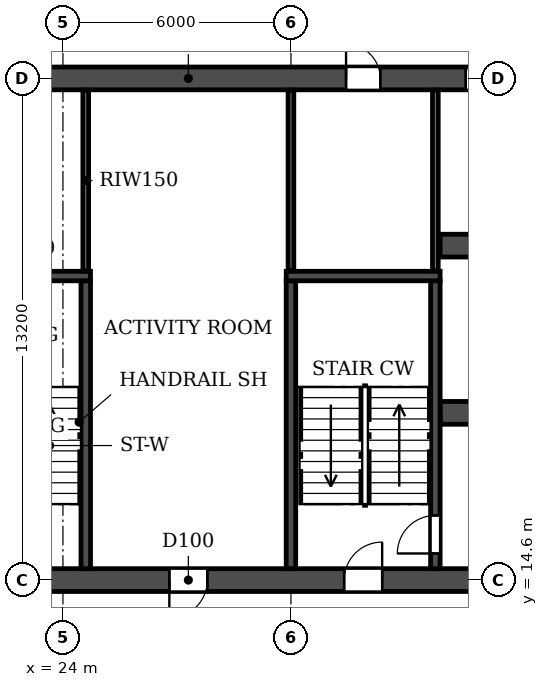
"""IFC4 building model, lengths in metres.
Left out: names, types, materials, properties, quantities, classifications, styles, units other than length and angle.
Written with IfcOpenShell. Run it as: python <this file> out.ifc"""

import sys

from ifc_helpers import new_model, si_unit, direction, frame, frame_2d, origin, place, context, subcontext, project, spatial, rectangle, extrude, element, fill, save


model = new_model("IFC4")
c1 = context("Model", 3, precision=1e-05, world=origin(), true_north=direction((0.0, 1.0)))
c2 = subcontext(c1, "Body", "Model", "MODEL_VIEW")
j1 = project(units=[si_unit("LENGTHUNIT", "METRE"), si_unit("PLANEANGLEUNIT", "RADIAN")], contexts=[c1])
p1 = place(None, origin())
s1 = spatial("IfcSite", under=j1, at=p1, CompositionType="ELEMENT")
p2 = place(p1, origin())
s2 = spatial("IfcBuilding", under=s1, at=p2, CompositionType="ELEMENT")
p3 = place(p2, frame((0.0, 0.0, 23.4)))
s3 = spatial("IfcBuildingStorey", under=s2, at=p3, CompositionType="ELEMENT", Elevation=23.4)
p4 = place(p3, frame((2.6, 14.6, 0.0), z_axis=(0.0, 0.0, 1.0), x_axis=(1.0, 0.0, 0.0)))
e1 = element("IfcWall", 1, at=p4, inside=s3, PredefinedType="SOLIDWALL", context=c2, shape_type="SweptSolid", body=[
    extrude(rectangle(XDim=96.8, YDim=0.6, at=frame_2d((48.4, 0.0))), origin(), (0.0, 0.0, 1.0), 3.05),
])
p5 = place(p4, frame((7.2, 0.0, 0.0)))
e2 = element("IfcOpeningElement", 2, at=p5, cuts=e1, PredefinedType="OPENING", context=c2, shape_type="SweptSolid", body=[
    extrude(rectangle(XDim=1.0, YDim=2.1, at=frame_2d((0.5, 1.05))), frame((0.0, 0.31, 0.0), z_axis=(0.0, -1.0, 0.0), x_axis=(1.0, 0.0, 0.0)), (0.0, 0.0, 1.0), 0.62),
])
p6 = place(p4, frame((16.3, 0.0, 0.0)))
e3 = element("IfcOpeningElement", 3, at=p6, cuts=e1, PredefinedType="OPENING", context=c2, shape_type="SweptSolid", body=[
    extrude(rectangle(XDim=1.0, YDim=2.1, at=frame_2d((0.5, 1.05))), frame((0.0, 0.31, 0.0), z_axis=(0.0, -1.0, 0.0), x_axis=(1.0, 0.0, 0.0)), (0.0, 0.0, 1.0), 0.62),
])
p7 = place(p4, frame((24.2, 0.0, 0.0)))
e4 = element("IfcOpeningElement", 4, at=p7, cuts=e1, PredefinedType="OPENING", context=c2, shape_type="SweptSolid", body=[
    extrude(rectangle(XDim=1.0, YDim=2.1, at=frame_2d((0.5, 1.05))), frame((0.0, 0.31, 0.0), z_axis=(0.0, -1.0, 0.0), x_axis=(1.0, 0.0, 0.0)), (0.0, 0.0, 1.0), 0.62),
])
p8 = place(p4, frame((28.8, 0.0, 0.0)))
e5 = element("IfcOpeningElement", 5, at=p8, cuts=e1, PredefinedType="OPENING", context=c2, shape_type="SweptSolid", body=[
    extrude(rectangle(XDim=1.0, YDim=2.1, at=frame_2d((0.5, 1.05))), frame((0.0, 0.31, 0.0), z_axis=(0.0, -1.0, 0.0), x_axis=(1.0, 0.0, 0.0)), (0.0, 0.0, 1.0), 0.62),
])
p9 = place(p4, frame((40.1, 0.0, 0.0)))
e6 = element("IfcOpeningElement", 6, at=p9, cuts=e1, PredefinedType="OPENING", context=c2, shape_type="SweptSolid", body=[
    extrude(rectangle(XDim=1.0, YDim=2.1, at=frame_2d((0.5, 1.05))), frame((0.0, 0.31, 0.0), z_axis=(0.0, -1.0, 0.0), x_axis=(1.0, 0.0, 0.0)), (0.0, 0.0, 1.0), 0.62),
])
p10 = place(p4, frame((44.0, 0.0, 0.0)))
e7 = element("IfcOpeningElement", 7, at=p10, cuts=e1, PredefinedType="OPENING", context=c2, shape_type="SweptSolid", body=[
    extrude(rectangle(XDim=1.0, YDim=2.1, at=frame_2d((0.5, 1.05))), frame((0.0, 0.31, 0.0), z_axis=(0.0, -1.0, 0.0), x_axis=(1.0, 0.0, 0.0)), (0.0, 0.0, 1.0), 0.62),
])
p11 = place(p4, frame((47.9, 0.0, 0.0)))
e8 = element("IfcOpeningElement", 8, at=p11, cuts=e1, PredefinedType="OPENING", context=c2, shape_type="SweptSolid", body=[
    extrude(rectangle(XDim=1.0, YDim=2.1, at=frame_2d((0.5, 1.05))), frame((0.0, 0.31, 0.0), z_axis=(0.0, -1.0, 0.0), x_axis=(1.0, 0.0, 0.0)), (0.0, 0.0, 1.0), 0.62),
])
p12 = place(p4, frame((53.1, 0.0, 0.0)))
e9 = element("IfcOpeningElement", 9, at=p12, cuts=e1, PredefinedType="OPENING", context=c2, shape_type="SweptSolid", body=[
    extrude(rectangle(XDim=1.0, YDim=2.1, at=frame_2d((0.5, 1.05))), frame((0.0, 0.31, 0.0), z_axis=(0.0, -1.0, 0.0), x_axis=(1.0, 0.0, 0.0)), (0.0, 0.0, 1.0), 0.62),
])
p13 = place(p4, frame((67.0, 0.0, 0.0)))
e10 = element("IfcOpeningElement", 10, at=p13, cuts=e1, PredefinedType="OPENING", context=c2, shape_type="SweptSolid", body=[
    extrude(rectangle(XDim=1.0, YDim=2.1, at=frame_2d((0.5, 1.05))), frame((0.0, 0.31, 0.0), z_axis=(0.0, -1.0, 0.0), x_axis=(1.0, 0.0, 0.0)), (0.0, 0.0, 1.0), 0.62),
])
p14 = place(p4, frame((71.6, 0.0, 0.0)))
e11 = element("IfcOpeningElement", 11, at=p14, cuts=e1, PredefinedType="OPENING", context=c2, shape_type="SweptSolid", body=[
    extrude(rectangle(XDim=1.0, YDim=2.1, at=frame_2d((0.5, 1.05))), frame((0.0, 0.31, 0.0), z_axis=(0.0, -1.0, 0.0), x_axis=(1.0, 0.0, 0.0)), (0.0, 0.0, 1.0), 0.62),
])
p15 = place(p4, frame((79.5, 0.0, 0.0)))
e12 = element("IfcOpeningElement", 12, at=p15, cuts=e1, PredefinedType="OPENING", context=c2, shape_type="SweptSolid", body=[
    extrude(rectangle(XDim=1.0, YDim=2.1, at=frame_2d((0.5, 1.05))), frame((0.0, 0.31, 0.0), z_axis=(0.0, -1.0, 0.0), x_axis=(1.0, 0.0, 0.0)), (0.0, 0.0, 1.0), 0.62),
])
p16 = place(p4, frame((83.15, 0.0, 0.0)))
e13 = element("IfcOpeningElement", 13, at=p16, cuts=e1, PredefinedType="OPENING", context=c2, shape_type="SweptSolid", body=[
    extrude(rectangle(XDim=1.0, YDim=2.1, at=frame_2d((0.5, 1.05))), frame((0.0, 0.31, 0.0), z_axis=(0.0, -1.0, 0.0), x_axis=(1.0, 0.0, 0.0)), (0.0, 0.0, 1.0), 0.62),
])
p17 = place(p4, frame((90.85, 0.0, 0.0)))
e14 = element("IfcOpeningElement", 14, at=p17, cuts=e1, PredefinedType="OPENING", context=c2, shape_type="SweptSolid", body=[
    extrude(rectangle(XDim=1.0, YDim=2.1, at=frame_2d((0.5, 1.05))), frame((0.0, 0.31, 0.0), z_axis=(0.0, -1.0, 0.0), x_axis=(1.0, 0.0, 0.0)), (0.0, 0.0, 1.0), 0.62),
])
p18 = place(p3, frame((2.6, 27.8, 0.0), z_axis=(0.0, 0.0, 1.0), x_axis=(1.0, 0.0, 0.0)))
e15 = element("IfcWall", 15, at=p18, inside=s3, PredefinedType="SOLIDWALL", context=c2, shape_type="SweptSolid", body=[
    extrude(rectangle(XDim=96.8, YDim=0.6, at=frame_2d((48.4, 0.0))), origin(), (0.0, 0.0, 1.0), 3.05),
])
p19 = place(p18, frame((1.8, 0.0, 0.0)))
e16 = element("IfcOpeningElement", 16, at=p19, cuts=e15, PredefinedType="OPENING", context=c2, shape_type="SweptSolid", body=[
    extrude(rectangle(XDim=1.0, YDim=2.1, at=frame_2d((0.5, 1.05))), frame((0.0, 0.31, 0.0), z_axis=(0.0, -1.0, 0.0), x_axis=(1.0, 0.0, 0.0)), (0.0, 0.0, 1.0), 0.62),
])
p20 = place(p18, frame((9.5, 0.0, 0.0)))
e17 = element("IfcOpeningElement", 17, at=p20, cuts=e15, PredefinedType="OPENING", context=c2, shape_type="SweptSolid", body=[
    extrude(rectangle(XDim=1.0, YDim=2.1, at=frame_2d((0.5, 1.05))), frame((0.0, 0.31, 0.0), z_axis=(0.0, -1.0, 0.0), x_axis=(1.0, 0.0, 0.0)), (0.0, 0.0, 1.0), 0.62),
])
p21 = place(p18, frame((16.3, 0.0, 0.0)))
e18 = element("IfcOpeningElement", 18, at=p21, cuts=e15, PredefinedType="OPENING", context=c2, shape_type="SweptSolid", body=[
    extrude(rectangle(XDim=1.0, YDim=2.1, at=frame_2d((0.5, 1.05))), frame((0.0, 0.31, 0.0), z_axis=(0.0, -1.0, 0.0), x_axis=(1.0, 0.0, 0.0)), (0.0, 0.0, 1.0), 0.62),
])
p22 = place(p18, frame((19.65, 0.0, 0.0)))
e19 = element("IfcOpeningElement", 19, at=p22, cuts=e15, PredefinedType="OPENING", context=c2, shape_type="SweptSolid", body=[
    extrude(rectangle(XDim=0.9, YDim=2.1, at=frame_2d((0.45, 1.05))), frame((0.0, 0.31, 0.0), z_axis=(0.0, -1.0, 0.0), x_axis=(1.0, 0.0, 0.0)), (0.0, 0.0, 1.0), 0.62),
])
p23 = place(p18, frame((28.85, 0.0, 0.0)))
e20 = element("IfcOpeningElement", 20, at=p23, cuts=e15, PredefinedType="OPENING", context=c2, shape_type="SweptSolid", body=[
    extrude(rectangle(XDim=0.9, YDim=2.1, at=frame_2d((0.45, 1.05))), frame((0.0, 0.31, 0.0), z_axis=(0.0, -1.0, 0.0), x_axis=(1.0, 0.0, 0.0)), (0.0, 0.0, 1.0), 0.62),
])
p24 = place(p18, frame((32.0, 0.0, 0.0)))
e21 = element("IfcOpeningElement", 21, at=p24, cuts=e15, PredefinedType="OPENING", context=c2, shape_type="SweptSolid", body=[
    extrude(rectangle(XDim=1.0, YDim=2.1, at=frame_2d((0.5, 1.05))), frame((0.0, 0.31, 0.0), z_axis=(0.0, -1.0, 0.0), x_axis=(1.0, 0.0, 0.0)), (0.0, 0.0, 1.0), 0.62),
])
p25 = place(p18, frame((37.2, 0.0, 0.0)))
e22 = element("IfcOpeningElement", 22, at=p25, cuts=e15, PredefinedType="OPENING", context=c2, shape_type="SweptSolid", body=[
    extrude(rectangle(XDim=1.0, YDim=2.1, at=frame_2d((0.5, 1.05))), frame((0.0, 0.31, 0.0), z_axis=(0.0, -1.0, 0.0), x_axis=(1.0, 0.0, 0.0)), (0.0, 0.0, 1.0), 0.62),
])
p26 = place(p18, frame((45.0, 0.0, 0.0)))
e23 = element("IfcOpeningElement", 23, at=p26, cuts=e15, PredefinedType="OPENING", context=c2, shape_type="SweptSolid", body=[
    extrude(rectangle(XDim=1.0, YDim=2.1, at=frame_2d((0.5, 1.05))), frame((0.0, 0.31, 0.0), z_axis=(0.0, -1.0, 0.0), x_axis=(1.0, 0.0, 0.0)), (0.0, 0.0, 1.0), 0.62),
])
p27 = place(p18, frame((47.9, 0.0, 0.0)))
e24 = element("IfcOpeningElement", 24, at=p27, cuts=e15, PredefinedType="OPENING", context=c2, shape_type="SweptSolid", body=[
    extrude(rectangle(XDim=1.0, YDim=2.1, at=frame_2d((0.5, 1.05))), frame((0.0, 0.31, 0.0), z_axis=(0.0, -1.0, 0.0), x_axis=(1.0, 0.0, 0.0)), (0.0, 0.0, 1.0), 0.62),
])
p28 = place(p18, frame((52.1, 0.0, 0.0)))
e25 = element("IfcOpeningElement", 25, at=p28, cuts=e15, PredefinedType="OPENING", context=c2, shape_type="SweptSolid", body=[
    extrude(rectangle(XDim=1.0, YDim=2.1, at=frame_2d((0.5, 1.05))), frame((0.0, 0.31, 0.0), z_axis=(0.0, -1.0, 0.0), x_axis=(1.0, 0.0, 0.0)), (0.0, 0.0, 1.0), 0.62),
])
p29 = place(p18, frame((56.0, 0.0, 0.0)))
e26 = element("IfcOpeningElement", 26, at=p29, cuts=e15, PredefinedType="OPENING", context=c2, shape_type="SweptSolid", body=[
    extrude(rectangle(XDim=1.0, YDim=2.1, at=frame_2d((0.5, 1.05))), frame((0.0, 0.31, 0.0), z_axis=(0.0, -1.0, 0.0), x_axis=(1.0, 0.0, 0.0)), (0.0, 0.0, 1.0), 0.62),
])
p30 = place(p18, frame((58.6, 0.0, 0.0)))
e27 = element("IfcOpeningElement", 27, at=p30, cuts=e15, PredefinedType="OPENING", context=c2, shape_type="SweptSolid", body=[
    extrude(rectangle(XDim=1.0, YDim=2.1, at=frame_2d((0.5, 1.05))), frame((0.0, 0.31, 0.0), z_axis=(0.0, -1.0, 0.0), x_axis=(1.0, 0.0, 0.0)), (0.0, 0.0, 1.0), 0.62),
])
p31 = place(p18, frame((61.2, 0.0, 0.0)))
e28 = element("IfcOpeningElement", 28, at=p31, cuts=e15, PredefinedType="OPENING", context=c2, shape_type="SweptSolid", body=[
    extrude(rectangle(XDim=1.0, YDim=2.1, at=frame_2d((0.5, 1.05))), frame((0.0, 0.31, 0.0), z_axis=(0.0, -1.0, 0.0), x_axis=(1.0, 0.0, 0.0)), (0.0, 0.0, 1.0), 0.62),
])
p32 = place(p18, frame((63.8, 0.0, 0.0)))
e29 = element("IfcOpeningElement", 29, at=p32, cuts=e15, PredefinedType="OPENING", context=c2, shape_type="SweptSolid", body=[
    extrude(rectangle(XDim=1.0, YDim=2.1, at=frame_2d((0.5, 1.05))), frame((0.0, 0.31, 0.0), z_axis=(0.0, -1.0, 0.0), x_axis=(1.0, 0.0, 0.0)), (0.0, 0.0, 1.0), 0.62),
])
p33 = place(p18, frame((67.05, 0.0, 0.0)))
e30 = element("IfcOpeningElement", 30, at=p33, cuts=e15, PredefinedType="OPENING", context=c2, shape_type="SweptSolid", body=[
    extrude(rectangle(XDim=0.9, YDim=2.1, at=frame_2d((0.45, 1.05))), frame((0.0, 0.31, 0.0), z_axis=(0.0, -1.0, 0.0), x_axis=(1.0, 0.0, 0.0)), (0.0, 0.0, 1.0), 0.62),
])
p34 = place(p18, frame((76.25, 0.0, 0.0)))
e31 = element("IfcOpeningElement", 31, at=p34, cuts=e15, PredefinedType="OPENING", context=c2, shape_type="SweptSolid", body=[
    extrude(rectangle(XDim=0.9, YDim=2.1, at=frame_2d((0.45, 1.05))), frame((0.0, 0.31, 0.0), z_axis=(0.0, -1.0, 0.0), x_axis=(1.0, 0.0, 0.0)), (0.0, 0.0, 1.0), 0.62),
])
p35 = place(p18, frame((79.5, 0.0, 0.0)))
e32 = element("IfcOpeningElement", 32, at=p35, cuts=e15, PredefinedType="OPENING", context=c2, shape_type="SweptSolid", body=[
    extrude(rectangle(XDim=1.0, YDim=2.1, at=frame_2d((0.5, 1.05))), frame((0.0, 0.31, 0.0), z_axis=(0.0, -1.0, 0.0), x_axis=(1.0, 0.0, 0.0)), (0.0, 0.0, 1.0), 0.62),
])
p36 = place(p18, frame((88.6, 0.0, 0.0)))
e33 = element("IfcOpeningElement", 33, at=p36, cuts=e15, PredefinedType="OPENING", context=c2, shape_type="SweptSolid", body=[
    extrude(rectangle(XDim=1.0, YDim=2.1, at=frame_2d((0.5, 1.05))), frame((0.0, 0.31, 0.0), z_axis=(0.0, -1.0, 0.0), x_axis=(1.0, 0.0, 0.0)), (0.0, 0.0, 1.0), 0.62),
])
p37 = place(p3, frame((33.925, 19.0, 0.0), z_axis=(0.0, 0.0, 1.0), x_axis=(1.0, 0.0, 0.0)))
e34 = element("IfcWall", 34, at=p37, inside=s3, PredefinedType="SOLIDWALL", context=c2, shape_type="SweptSolid", body=[
    extrude(rectangle(XDim=34.15, YDim=0.6, at=frame_2d((17.075, 0.0))), origin(), (0.0, 0.0, 1.0), 3.05),
])
p38 = place(p37, frame((16.175, 0.0, 0.0)))
e35 = element("IfcOpeningElement", 35, at=p38, cuts=e34, PredefinedType="OPENING", context=c2, shape_type="SweptSolid", body=[
    extrude(rectangle(XDim=1.8, YDim=2.1, at=frame_2d((0.9, 1.05))), frame((0.0, 0.31, 0.0), z_axis=(0.0, -1.0, 0.0), x_axis=(1.0, 0.0, 0.0)), (0.0, 0.0, 1.0), 0.62),
])
p39 = place(p37, frame((1.525, 0.0, 0.0)))
e36 = element("IfcOpeningElement", 36, at=p39, cuts=e34, PredefinedType="OPENING", context=c2, shape_type="SweptSolid", body=[
    extrude(rectangle(XDim=1.8, YDim=2.1, at=frame_2d((0.9, 1.05))), frame((0.0, 0.31, 0.0), z_axis=(0.0, -1.0, 0.0), x_axis=(1.0, 0.0, 0.0)), (0.0, 0.0, 1.0), 0.62),
])
p40 = place(p37, frame((8.725, 0.0, 0.0)))
e37 = element("IfcOpeningElement", 37, at=p40, cuts=e34, PredefinedType="OPENING", context=c2, shape_type="SweptSolid", body=[
    extrude(rectangle(XDim=1.1, YDim=2.1, at=frame_2d((0.55, 1.05))), frame((0.0, 0.31, 0.0), z_axis=(0.0, -1.0, 0.0), x_axis=(1.0, 0.0, 0.0)), (0.0, 0.0, 1.0), 0.62),
])
p41 = place(p37, frame((11.325, 0.0, 0.0)))
e38 = element("IfcOpeningElement", 38, at=p41, cuts=e34, PredefinedType="OPENING", context=c2, shape_type="SweptSolid", body=[
    extrude(rectangle(XDim=1.1, YDim=2.1, at=frame_2d((0.55, 1.05))), frame((0.0, 0.31, 0.0), z_axis=(0.0, -1.0, 0.0), x_axis=(1.0, 0.0, 0.0)), (0.0, 0.0, 1.0), 0.62),
])
p42 = place(p37, frame((13.925, 0.0, 0.0)))
e39 = element("IfcOpeningElement", 39, at=p42, cuts=e34, PredefinedType="OPENING", context=c2, shape_type="SweptSolid", body=[
    extrude(rectangle(XDim=1.1, YDim=2.1, at=frame_2d((0.55, 1.05))), frame((0.0, 0.31, 0.0), z_axis=(0.0, -1.0, 0.0), x_axis=(1.0, 0.0, 0.0)), (0.0, 0.0, 1.0), 0.62),
])
p43 = place(p37, frame((19.125, 0.0, 0.0)))
e40 = element("IfcOpeningElement", 40, at=p43, cuts=e34, PredefinedType="OPENING", context=c2, shape_type="SweptSolid", body=[
    extrude(rectangle(XDim=1.1, YDim=2.1, at=frame_2d((0.55, 1.05))), frame((0.0, 0.31, 0.0), z_axis=(0.0, -1.0, 0.0), x_axis=(1.0, 0.0, 0.0)), (0.0, 0.0, 1.0), 0.62),
])
p44 = place(p37, frame((21.725, 0.0, 0.0)))
e41 = element("IfcOpeningElement", 41, at=p44, cuts=e34, PredefinedType="OPENING", context=c2, shape_type="SweptSolid", body=[
    extrude(rectangle(XDim=1.1, YDim=2.1, at=frame_2d((0.55, 1.05))), frame((0.0, 0.31, 0.0), z_axis=(0.0, -1.0, 0.0), x_axis=(1.0, 0.0, 0.0)), (0.0, 0.0, 1.0), 0.62),
])
p45 = place(p37, frame((24.325, 0.0, 0.0)))
e42 = element("IfcOpeningElement", 42, at=p45, cuts=e34, PredefinedType="OPENING", context=c2, shape_type="SweptSolid", body=[
    extrude(rectangle(XDim=1.1, YDim=2.1, at=frame_2d((0.55, 1.05))), frame((0.0, 0.31, 0.0), z_axis=(0.0, -1.0, 0.0), x_axis=(1.0, 0.0, 0.0)), (0.0, 0.0, 1.0), 0.62),
])
p46 = place(p37, frame((30.825, 0.0, 0.0)))
e43 = element("IfcOpeningElement", 43, at=p46, cuts=e34, PredefinedType="OPENING", context=c2, shape_type="SweptSolid", body=[
    extrude(rectangle(XDim=1.8, YDim=2.1, at=frame_2d((0.9, 1.05))), frame((0.0, 0.31, 0.0), z_axis=(0.0, -1.0, 0.0), x_axis=(1.0, 0.0, 0.0)), (0.0, 0.0, 1.0), 0.62),
])
p47 = place(p3, frame((33.925, 23.4, 0.0), z_axis=(0.0, 0.0, 1.0), x_axis=(1.0, 0.0, 0.0)))
e44 = element("IfcWall", 44, at=p47, inside=s3, PredefinedType="SOLIDWALL", context=c2, shape_type="SweptSolid", body=[
    extrude(rectangle(XDim=34.15, YDim=0.6, at=frame_2d((17.075, 0.0))), origin(), (0.0, 0.0, 1.0), 3.05),
])
p48 = place(p47, frame((16.175, 0.0, 0.0)))
e45 = element("IfcOpeningElement", 45, at=p48, cuts=e44, PredefinedType="OPENING", context=c2, shape_type="SweptSolid", body=[
    extrude(rectangle(XDim=1.8, YDim=2.1, at=frame_2d((0.9, 1.05))), frame((0.0, 0.31, 0.0), z_axis=(0.0, -1.0, 0.0), x_axis=(1.0, 0.0, 0.0)), (0.0, 0.0, 1.0), 0.62),
])
p49 = place(p47, frame((11.025, 0.0, 0.0)))
e46 = element("IfcOpeningElement", 46, at=p49, cuts=e44, PredefinedType="OPENING", context=c2, shape_type="SweptSolid", body=[
    extrude(rectangle(XDim=1.1, YDim=2.1, at=frame_2d((0.55, 1.05))), frame((0.0, 0.31, 0.0), z_axis=(0.0, -1.0, 0.0), x_axis=(1.0, 0.0, 0.0)), (0.0, 0.0, 1.0), 0.62),
])
p50 = place(p3, frame((30.0, 14.9, 0.0), z_axis=(0.0, 0.0, 1.0), x_axis=(0.0, 1.0, 0.0)))
e47 = element("IfcWall", 47, at=p50, inside=s3, PredefinedType="SOLIDWALL", context=c2, shape_type="SweptSolid", body=[
    extrude(rectangle(XDim=7.575, YDim=0.25, at=frame_2d((3.788, 0.0))), origin(), (0.0, 0.0, 1.0), 3.05),
])
p51 = place(p3, frame((33.8, 14.9, 0.0), z_axis=(0.0, 0.0, 1.0), x_axis=(0.0, 1.0, 0.0)))
e48 = element("IfcWall", 48, at=p51, inside=s3, PredefinedType="SOLIDWALL", context=c2, shape_type="SweptSolid", body=[
    extrude(rectangle(XDim=7.575, YDim=0.25, at=frame_2d((3.788, 0.0))), origin(), (0.0, 0.0, 1.0), 3.05),
])
p52 = place(p51, frame((0.4, 0.0, 0.0)))
e49 = element("IfcOpeningElement", 49, at=p52, cuts=e48, PredefinedType="OPENING", context=c2, shape_type="SweptSolid", body=[
    extrude(rectangle(XDim=1.0, YDim=2.1, at=frame_2d((0.5, 1.05))), frame((0.0, 0.135, 0.0), z_axis=(0.0, -1.0, 0.0), x_axis=(1.0, 0.0, 0.0)), (0.0, 0.0, 1.0), 0.27),
])
p53 = place(p3, frame((29.875, 22.6, 0.0), z_axis=(0.0, 0.0, 1.0), x_axis=(1.0, 0.0, 0.0)))
e50 = element("IfcWall", 50, at=p53, inside=s3, PredefinedType="SOLIDWALL", context=c2, shape_type="SweptSolid", body=[
    extrude(rectangle(XDim=4.05, YDim=0.25, at=frame_2d((2.025, 0.0))), origin(), (0.0, 0.0, 1.0), 3.05),
])
p54 = place(p3, frame((24.6, 14.9, 0.0), z_axis=(0.0, 0.0, 1.0), x_axis=(0.0, 1.0, 0.0)))
e51 = element("IfcWall", 51, at=p54, inside=s3, PredefinedType="SOLIDWALL", context=c2, shape_type="SweptSolid", body=[
    extrude(rectangle(XDim=7.575, YDim=0.25, at=frame_2d((3.788, 0.0))), origin(), (0.0, 0.0, 1.0), 3.05),
])
p55 = place(p3, frame((20.675, 22.6, 0.0), z_axis=(0.0, 0.0, 1.0), x_axis=(1.0, 0.0, 0.0)))
e52 = element("IfcWall", 52, at=p55, inside=s3, PredefinedType="SOLIDWALL", context=c2, shape_type="SweptSolid", body=[
    extrude(rectangle(XDim=4.05, YDim=0.25, at=frame_2d((2.025, 0.0))), origin(), (0.0, 0.0, 1.0), 3.05),
])
for number, where, z_axis, x_axis in (
    (53, (24.6, 22.735, 0.0), (0.0, 0.0, 1.0), (0.0, 1.0, 0.0)),
    (54, (30.0, 22.735, 0.0), (0.0, 0.0, 1.0), (0.0, 1.0, 0.0)),
    (55, (33.8, 22.735, 0.0), (0.0, 0.0, 1.0), (0.0, 1.0, 0.0)),
):
    element("IfcWall", number, at=place(p3, frame(where, z_axis=z_axis, x_axis=x_axis)), inside=s3, PredefinedType="PARTITIONING", context=c2, shape_type="SweptSolid", body=[
        extrude(rectangle(XDim=4.755, YDim=0.15, at=frame_2d((2.377, 0.0))), origin(), (0.0, 0.0, 1.0), 3.05),
    ])
p56 = place(p23, origin())
e56 = element("IfcDoor", 56, at=p56, inside=s3, OperationType="SINGLE_SWING_LEFT", PredefinedType="DOOR", context=c2, shape_type="SweptSolid", body=[
    extrude(rectangle(XDim=0.9, YDim=2.1, at=frame_2d((0.45, 1.05))), frame((0.0, 0.025, 0.0), z_axis=(0.0, -1.0, 0.0), x_axis=(1.0, 0.0, 0.0)), (0.0, 0.0, 1.0), 0.05),
])
fill(e20, e56)
p57 = place(p24, origin())
e57 = element("IfcDoor", 57, at=p57, inside=s3, OperationType="SINGLE_SWING_RIGHT", PredefinedType="DOOR", context=c2, shape_type="SweptSolid", body=[
    extrude(rectangle(XDim=1.0, YDim=2.1, at=frame_2d((0.5, 1.05))), frame((0.0, 0.025, 0.0), z_axis=(0.0, -1.0, 0.0), x_axis=(1.0, 0.0, 0.0)), (0.0, 0.0, 1.0), 0.05),
])
fill(e21, e57)
p58 = place(p7, frame((1.0, 0.0, 0.0), z_axis=(0.0, 0.0, 1.0), x_axis=(-1.0, 0.0, 0.0)))
e58 = element("IfcDoor", 58, at=p58, inside=s3, OperationType="SINGLE_SWING_RIGHT", PredefinedType="DOOR", context=c2, shape_type="SweptSolid", body=[
    extrude(rectangle(XDim=1.0, YDim=2.1, at=frame_2d((0.5, 1.05))), frame((0.0, 0.025, 0.0), z_axis=(0.0, -1.0, 0.0), x_axis=(1.0, 0.0, 0.0)), (0.0, 0.0, 1.0), 0.05),
])
fill(e4, e58)
p59 = place(p8, origin())
e59 = element("IfcDoor", 59, at=p59, inside=s3, OperationType="SINGLE_SWING_RIGHT", PredefinedType="DOOR", context=c2, shape_type="SweptSolid", body=[
    extrude(rectangle(XDim=1.0, YDim=2.1, at=frame_2d((0.5, 1.05))), frame((0.0, 0.025, 0.0), z_axis=(0.0, -1.0, 0.0), x_axis=(1.0, 0.0, 0.0)), (0.0, 0.0, 1.0), 0.05),
])
fill(e5, e59)
p60 = place(p52, origin())
e60 = element("IfcDoor", 60, at=p60, inside=s3, OperationType="SINGLE_SWING_LEFT", PredefinedType="DOOR", context=c2, shape_type="SweptSolid", body=[
    extrude(rectangle(XDim=1.0, YDim=2.1, at=frame_2d((0.5, 1.05))), frame((0.0, 0.025, 0.0), z_axis=(0.0, -1.0, 0.0), x_axis=(1.0, 0.0, 0.0)), (0.0, 0.0, 1.0), 0.05),
])
fill(e49, e60)
save(model, sys.argv[1])
